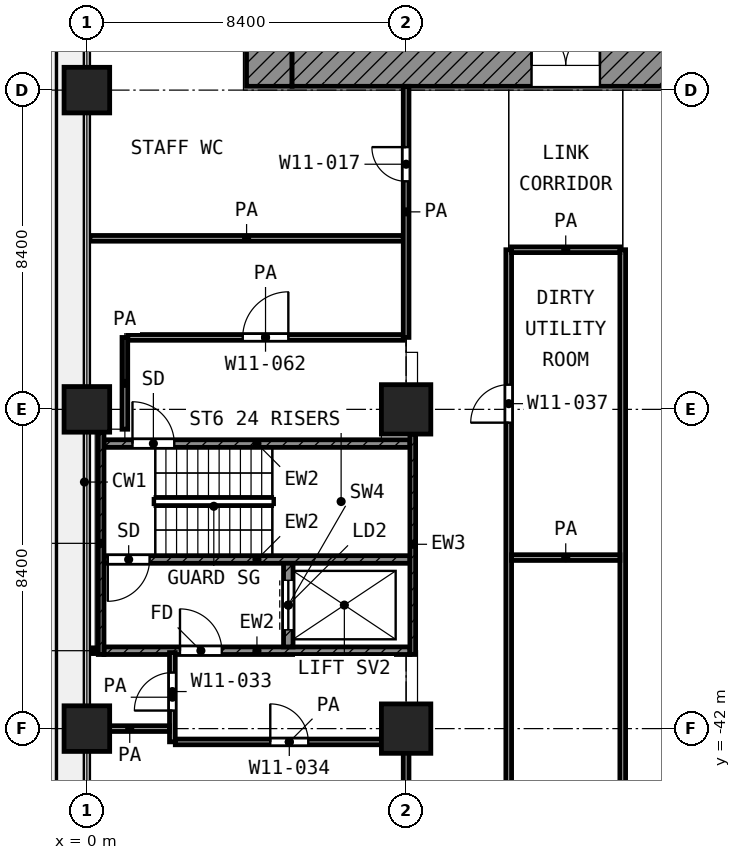
"""IFC4 building model, lengths in metres.
Left out: names, types, materials, properties, quantities, classifications, styles, units other than length and angle.
Written with IfcOpenShell. Run it as: python <this file> out.ifc"""

import sys

from ifc_helpers import new_model, si_unit, direction, frame, frame_2d, origin, origin_2d, place, context, subcontext, project, spatial, rectangle, extrude, element, fill, save


model = new_model("IFC4")
c1 = context("Model", 3, precision=1e-05, world=origin(), true_north=direction((0.0, 1.0)))
c2 = subcontext(c1, "Body", "Model", "MODEL_VIEW")
j1 = project(units=[si_unit("LENGTHUNIT", "METRE"), si_unit("PLANEANGLEUNIT", "RADIAN")], contexts=[c1])
p1 = place(None, origin())
s1 = spatial("IfcSite", under=j1, at=p1, CompositionType="ELEMENT")
p2 = place(p1, origin())
s2 = spatial("IfcBuilding", under=s1, at=p2, CompositionType="ELEMENT")
p3 = place(p2, frame((0.0, 0.0, 51.8)))
s3 = spatial("IfcBuildingStorey", under=s2, at=p3, CompositionType="ELEMENT", Elevation=51.8)
for number, where, z_axis, x_axis in (
    (1, (0.0, -25.2, 0.0), (0.0, 0.0, 1.0), (1.0, 0.0, 0.0)),
    (2, (0.0, -33.6, 0.0), (0.0, 0.0, 1.0), (1.0, 0.0, 0.0)),
):
    element("IfcColumn", number, at=place(p3, frame(where, z_axis=z_axis, x_axis=x_axis)), inside=s3, PredefinedType="COLUMN", context=c2, shape_type="SweptSolid", body=[
        extrude(rectangle(XDim=1.2, YDim=1.2, at=origin_2d()), origin(), (0.0, 0.0, 1.0), 4.2),
    ])
p4 = place(p3, frame((8.4, -33.6, 0.0), z_axis=(0.0, 0.0, 1.0), x_axis=(1.0, 0.0, 0.0)))
e3 = element("IfcColumn", 3, at=p4, inside=s3, PredefinedType="COLUMN", context=c2, shape_type="SweptSolid", body=[
    extrude(rectangle(XDim=1.3, YDim=1.3, at=origin_2d()), origin(), (0.0, 0.0, 1.0), 4.2),
])
p5 = place(p3, frame((0.0, -42.0, 0.0), z_axis=(0.0, 0.0, 1.0), x_axis=(1.0, 0.0, 0.0)))
e4 = element("IfcColumn", 4, at=p5, inside=s3, PredefinedType="COLUMN", context=c2, shape_type="SweptSolid", body=[
    extrude(rectangle(XDim=1.2, YDim=1.2, at=origin_2d()), origin(), (0.0, 0.0, 1.0), 4.2),
])
p6 = place(p3, frame((8.4, -42.0, 0.0), z_axis=(0.0, 0.0, 1.0), x_axis=(1.0, 0.0, 0.0)))
e5 = element("IfcColumn", 5, at=p6, inside=s3, PredefinedType="COLUMN", context=c2, shape_type="SweptSolid", body=[
    extrude(rectangle(XDim=1.3, YDim=1.3, at=origin_2d()), origin(), (0.0, 0.0, 1.0), 4.2),
])
p7 = place(p3, frame((4.8, -25.1, 0.0), z_axis=(0.0, 0.0, 1.0), x_axis=(0.0, 1.0, 0.0)))
e6 = element("IfcWall", 6, at=p7, inside=s3, PredefinedType="SHEAR", context=c2, shape_type="SweptSolid", body=[
    extrude(rectangle(XDim=19.7, YDim=1.2, at=frame_2d((9.85, 0.0))), origin(), (0.0, 0.0, 1.0), 3.9),
])
p8 = place(p7, frame((11.55, 0.0, 0.0)))
e7 = element("IfcOpeningElement", 7, at=p8, cuts=e6, PredefinedType="OPENING", context=c2, shape_type="SweptSolid", body=[
    extrude(rectangle(XDim=1.1, YDim=2.1, at=frame_2d((0.55, 1.05))), frame((0.0, 0.61, 0.0), z_axis=(0.0, -1.0, 0.0), x_axis=(1.0, 0.0, 0.0)), (0.0, 0.0, 1.0), 1.22),
])
p9 = place(p7, frame((2.25, 0.0, 0.0)))
e8 = element("IfcOpeningElement", 8, at=p9, cuts=e6, PredefinedType="OPENING", context=c2, shape_type="SweptSolid", body=[
    extrude(rectangle(XDim=1.1, YDim=2.1, at=frame_2d((0.55, 1.05))), frame((0.0, 0.61, 0.0), z_axis=(0.0, -1.0, 0.0), x_axis=(1.0, 0.0, 0.0)), (0.0, 0.0, 1.0), 1.22),
])
p10 = place(p3, frame((5.4, -24.55, 0.0), z_axis=(0.0, 0.0, 1.0), x_axis=(1.0, 0.0, 0.0)))
e9 = element("IfcWall", 9, at=p10, inside=s3, PredefinedType="SHEAR", context=c2, shape_type="SweptSolid", body=[
    extrude(rectangle(XDim=18.6, YDim=1.1, at=frame_2d((9.3, 0.0))), origin(), (0.0, 0.0, 1.0), 3.9),
])
p11 = place(p10, frame((6.3, 0.0, 0.0)))
e10 = element("IfcOpeningElement", 10, at=p11, cuts=e9, PredefinedType="OPENING", context=c2, shape_type="SweptSolid", body=[
    extrude(rectangle(XDim=1.8, YDim=2.1, at=frame_2d((0.9, 1.05))), frame((0.0, 0.56, 0.0), z_axis=(0.0, -1.0, 0.0), x_axis=(1.0, 0.0, 0.0)), (0.0, 0.0, 1.0), 1.12),
])
p12 = place(p3, frame((0.375, -40.05, 0.0), z_axis=(0.0, 0.0, 1.0), x_axis=(0.0, 1.0, 0.0)))
e11 = element("IfcWall", 11, at=p12, inside=s3, PredefinedType="SHEAR", context=c2, shape_type="SweptSolid", body=[
    extrude(rectangle(XDim=5.85, YDim=0.15, at=frame_2d((2.925, 0.0))), origin(), (0.0, 0.0, 1.0), 3.9),
])
p13 = place(p3, frame((8.575, -40.05, 0.0), z_axis=(0.0, 0.0, 1.0), x_axis=(0.0, 1.0, 0.0)))
e12 = element("IfcWall", 12, at=p13, inside=s3, PredefinedType="SHEAR", context=c2, shape_type="SweptSolid", body=[
    extrude(rectangle(XDim=5.8, YDim=0.15, at=frame_2d((2.9, 0.0))), origin(), (0.0, 0.0, 1.0), 3.9),
])
p14 = place(p3, frame((0.45, -34.5, 0.0), z_axis=(0.0, 0.0, 1.0), x_axis=(1.0, 0.0, 0.0)))
e13 = element("IfcWall", 13, at=p14, inside=s3, PredefinedType="SHEAR", context=c2, shape_type="SweptSolid", body=[
    extrude(rectangle(XDim=8.05, YDim=0.2, at=frame_2d((4.025, 0.0))), origin(), (0.0, 0.0, 1.0), 3.9),
])
p15 = place(p14, frame((0.75, 0.0, 0.0)))
e14 = element("IfcOpeningElement", 14, at=p15, cuts=e13, PredefinedType="OPENING", context=c2, shape_type="SweptSolid", body=[
    extrude(rectangle(XDim=1.1, YDim=2.1, at=frame_2d((0.55, 1.05))), frame((0.0, 0.11, 0.0), z_axis=(0.0, -1.0, 0.0), x_axis=(1.0, 0.0, 0.0)), (0.0, 0.0, 1.0), 0.22),
])
p16 = place(p3, frame((0.45, -37.55, 0.0), z_axis=(0.0, 0.0, 1.0), x_axis=(1.0, 0.0, 0.0)))
e15 = element("IfcWall", 15, at=p16, inside=s3, PredefinedType="SHEAR", context=c2, shape_type="SweptSolid", body=[
    extrude(rectangle(XDim=8.05, YDim=0.2, at=frame_2d((4.025, 0.0))), origin(), (0.0, 0.0, 1.0), 3.9),
])
p17 = place(p16, frame((0.1, 0.0, 0.0)))
e16 = element("IfcOpeningElement", 16, at=p17, cuts=e15, PredefinedType="OPENING", context=c2, shape_type="SweptSolid", body=[
    extrude(rectangle(XDim=1.1, YDim=2.1, at=frame_2d((0.55, 1.05))), frame((0.0, 0.11, 0.0), z_axis=(0.0, -1.0, 0.0), x_axis=(1.0, 0.0, 0.0)), (0.0, 0.0, 1.0), 0.22),
])
p18 = place(p3, frame((0.45, -39.95, 0.0), z_axis=(0.0, 0.0, 1.0), x_axis=(1.0, 0.0, 0.0)))
e17 = element("IfcWall", 17, at=p18, inside=s3, PredefinedType="SHEAR", context=c2, shape_type="SweptSolid", body=[
    extrude(rectangle(XDim=8.05, YDim=0.2, at=frame_2d((4.025, 0.0))), origin(), (0.0, 0.0, 1.0), 3.9),
])
p19 = place(p18, frame((2.0, 0.0, 0.0)))
e18 = element("IfcOpeningElement", 18, at=p19, cuts=e17, PredefinedType="OPENING", context=c2, shape_type="SweptSolid", body=[
    extrude(rectangle(XDim=1.1, YDim=2.1, at=frame_2d((0.55, 1.05))), frame((0.0, 0.11, 0.0), z_axis=(0.0, -1.0, 0.0), x_axis=(1.0, 0.0, 0.0)), (0.0, 0.0, 1.0), 0.22),
])
p20 = place(p3, frame((5.3, -39.85, 0.0), z_axis=(0.0, 0.0, 1.0), x_axis=(0.0, 1.0, 0.0)))
e19 = element("IfcWall", 19, at=p20, inside=s3, PredefinedType="SHEAR", context=c2, shape_type="SweptSolid", body=[
    extrude(rectangle(XDim=2.2, YDim=0.25, at=frame_2d((1.1, 0.0))), origin(), (0.0, 0.0, 1.0), 3.9),
])
p21 = place(p20, frame((0.45, 0.0, 0.0)))
e20 = element("IfcOpeningElement", 20, at=p21, cuts=e19, PredefinedType="OPENING", context=c2, shape_type="SweptSolid", body=[
    extrude(rectangle(XDim=1.3, YDim=2.1, at=frame_2d((0.65, 1.05))), frame((0.0, 0.135, 0.0), z_axis=(0.0, -1.0, 0.0), x_axis=(1.0, 0.0, 0.0)), (0.0, 0.0, 1.0), 0.27),
])
p22 = place(p3, frame((2.327, -42.35, 0.0), z_axis=(0.0, 0.0, 1.0), x_axis=(1.0, 0.0, 0.0)))
e21 = element("IfcWall", 21, at=p22, inside=s3, PredefinedType="PARTITIONING", context=c2, shape_type="SweptSolid", body=[
    extrude(rectangle(XDim=5.998, YDim=0.15, at=frame_2d((2.999, 0.0))), origin(), (0.0, 0.0, 1.0), 3.9),
])
p23 = place(p22, frame((2.499, 0.0, 0.0)))
e22 = element("IfcOpeningElement", 22, at=p23, cuts=e21, PredefinedType="OPENING", context=c2, shape_type="SweptSolid", body=[
    extrude(rectangle(XDim=1.0, YDim=2.1, at=frame_2d((0.5, 1.05))), frame((0.0, 0.085, 0.0), z_axis=(0.0, -1.0, 0.0), x_axis=(1.0, 0.0, 0.0)), (0.0, 0.0, 1.0), 0.17),
])
p24 = place(p3, frame((0.08, -42.0, 0.0), z_axis=(0.0, 0.0, 1.0), x_axis=(1.0, 0.0, 0.0)))
e23 = element("IfcWall", 23, at=p24, inside=s3, PredefinedType="PARTITIONING", context=c2, shape_type="SweptSolid", body=[
    extrude(rectangle(XDim=2.095, YDim=0.15, at=frame_2d((1.047, 0.0))), origin(), (0.0, 0.0, 1.0), 3.9),
])
p25 = place(p3, frame((0.08, -39.95, 0.0), z_axis=(0.0, 0.0, 1.0), x_axis=(1.0, 0.0, 0.0)))
e24 = element("IfcWall", 24, at=p25, inside=s3, PredefinedType="PARTITIONING", context=c2, shape_type="SweptSolid", body=[
    extrude(rectangle(XDim=0.19, YDim=0.15, at=frame_2d((0.095, 0.0))), origin(), (0.0, 0.0, 1.0), 3.9),
])
p26 = place(p3, frame((11.175, -37.5, 0.0), z_axis=(0.0, 0.0, 1.0), x_axis=(1.0, 0.0, 0.0)))
e25 = element("IfcWall", 25, at=p26, inside=s3, PredefinedType="PARTITIONING", context=c2, shape_type="SweptSolid", body=[
    extrude(rectangle(XDim=2.85, YDim=0.15, at=frame_2d((1.425, 0.0))), origin(), (0.0, 0.0, 1.0), 3.9),
])
p27 = place(p3, frame((1.077, -31.707, 0.0), z_axis=(0.0, 0.0, 1.0), x_axis=(1.0, 0.0, 0.0)))
e26 = element("IfcWall", 26, at=p27, inside=s3, PredefinedType="PARTITIONING", context=c2, shape_type="SweptSolid", body=[
    extrude(rectangle(XDim=7.248, YDim=0.15, at=frame_2d((3.624, 0.0))), origin(), (0.0, 0.0, 1.0), 3.9),
])
p28 = place(p27, frame((3.024, 0.0, 0.0)))
e27 = element("IfcOpeningElement", 27, at=p28, cuts=e26, PredefinedType="OPENING", context=c2, shape_type="SweptSolid", body=[
    extrude(rectangle(XDim=1.2, YDim=2.1, at=frame_2d((0.6, 1.05))), frame((0.0, 0.085, 0.0), z_axis=(0.0, -1.0, 0.0), x_axis=(1.0, 0.0, 0.0)), (0.0, 0.0, 1.0), 0.17),
])
p29 = place(p3, frame((11.175, -29.4, 0.0), z_axis=(0.0, 0.0, 1.0), x_axis=(1.0, 0.0, 0.0)))
e28 = element("IfcWall", 28, at=p29, inside=s3, PredefinedType="PARTITIONING", context=c2, shape_type="SweptSolid", body=[
    extrude(rectangle(XDim=2.85, YDim=0.15, at=frame_2d((1.425, 0.0))), origin(), (0.0, 0.0, 1.0), 3.9),
])
p30 = place(p3, frame((0.08, -29.1, 0.0), z_axis=(0.0, 0.0, 1.0), x_axis=(1.0, 0.0, 0.0)))
e29 = element("IfcWall", 29, at=p30, inside=s3, PredefinedType="PARTITIONING", context=c2, shape_type="SweptSolid", body=[
    extrude(rectangle(XDim=8.245, YDim=0.15, at=frame_2d((4.123, 0.0))), origin(), (0.0, 0.0, 1.0), 3.9),
])
p31 = place(p3, frame((1.0, -34.123, 0.0), z_axis=(0.0, 0.0, 1.0), x_axis=(0.0, 1.0, 0.0)))
e30 = element("IfcWall", 30, at=p31, inside=s3, PredefinedType="PARTITIONING", context=c2, shape_type="SweptSolid", body=[
    extrude(rectangle(XDim=2.415, YDim=0.15, at=frame_2d((1.208, 0.0))), origin(), (0.0, 0.0, 1.0), 3.9),
])
p32 = place(p3, frame((2.25, -42.348, 0.0), z_axis=(0.0, 0.0, 1.0), x_axis=(0.0, 1.0, 0.0)))
e31 = element("IfcWall", 31, at=p32, inside=s3, PredefinedType="PARTITIONING", context=c2, shape_type="SweptSolid", body=[
    extrude(rectangle(XDim=2.348, YDim=0.15, at=frame_2d((1.174, 0.0))), origin(), (0.0, 0.0, 1.0), 3.9),
])
p33 = place(p32, frame((0.823, 0.0, 0.0)))
e32 = element("IfcOpeningElement", 32, at=p33, cuts=e31, PredefinedType="OPENING", context=c2, shape_type="SweptSolid", body=[
    extrude(rectangle(XDim=1.0, YDim=2.1, at=frame_2d((0.5, 1.05))), frame((0.0, 0.085, 0.0), z_axis=(0.0, -1.0, 0.0), x_axis=(1.0, 0.0, 0.0)), (0.0, 0.0, 1.0), 0.17),
])
p34 = place(p3, frame((8.4, -71.32, 0.0), z_axis=(0.0, 0.0, 1.0), x_axis=(0.0, 1.0, 0.0)))
e33 = element("IfcWall", 33, at=p34, inside=s3, PredefinedType="PARTITIONING", context=c2, shape_type="SweptSolid", body=[
    extrude(rectangle(XDim=28.97, YDim=0.15, at=frame_2d((14.485, 0.0))), origin(), (0.0, 0.0, 1.0), 3.9),
])
p35 = place(p34, frame((22.82, 0.0, 0.0)))
e34 = element("IfcOpeningElement", 34, at=p35, cuts=e33, PredefinedType="OPENING", context=c2, shape_type="SweptSolid", body=[
    extrude(rectangle(XDim=1.0, YDim=2.1, at=frame_2d((0.5, 1.05))), frame((0.0, 0.085, 0.0), z_axis=(0.0, -1.0, 0.0), x_axis=(1.0, 0.0, 0.0)), (0.0, 0.0, 1.0), 0.17),
])
p36 = place(p34, frame((19.02, 0.0, 0.0)))
e35 = element("IfcOpeningElement", 35, at=p36, cuts=e33, PredefinedType="OPENING", context=c2, shape_type="SweptSolid", body=[
    extrude(rectangle(XDim=1.2, YDim=2.1, at=frame_2d((0.6, 1.05))), frame((0.0, 0.085, 0.0), z_axis=(0.0, -1.0, 0.0), x_axis=(1.0, 0.0, 0.0)), (0.0, 0.0, 1.0), 0.17),
])
p37 = place(p34, frame((13.22, 0.0, 0.0)))
e36 = element("IfcOpeningElement", 36, at=p37, cuts=e33, PredefinedType="OPENING", context=c2, shape_type="SweptSolid", body=[
    extrude(rectangle(XDim=1.2, YDim=2.1, at=frame_2d((0.6, 1.05))), frame((0.0, 0.085, 0.0), z_axis=(0.0, -1.0, 0.0), x_axis=(1.0, 0.0, 0.0)), (0.0, 0.0, 1.0), 0.17),
])
p38 = place(p34, frame((10.12, 0.0, 0.0)))
e37 = element("IfcOpeningElement", 37, at=p38, cuts=e33, PredefinedType="OPENING", context=c2, shape_type="SweptSolid", body=[
    extrude(rectangle(XDim=1.2, YDim=2.1, at=frame_2d((0.6, 1.05))), frame((0.0, 0.085, 0.0), z_axis=(0.0, -1.0, 0.0), x_axis=(1.0, 0.0, 0.0)), (0.0, 0.0, 1.0), 0.17),
])
p39 = place(p34, frame((2.42, 0.0, 0.0)))
e38 = element("IfcOpeningElement", 38, at=p39, cuts=e33, PredefinedType="OPENING", context=c2, shape_type="SweptSolid", body=[
    extrude(rectangle(XDim=1.0, YDim=2.1, at=frame_2d((0.5, 1.05))), frame((0.0, 0.085, 0.0), z_axis=(0.0, -1.0, 0.0), x_axis=(1.0, 0.0, 0.0)), (0.0, 0.0, 1.0), 0.17),
])
p40 = place(p3, frame((8.4, -31.707, 0.0), z_axis=(0.0, 0.0, 1.0), x_axis=(0.0, 1.0, 0.0)))
e39 = element("IfcWall", 39, at=p40, inside=s3, PredefinedType="PARTITIONING", context=c2, shape_type="SweptSolid", body=[
    extrude(rectangle(XDim=6.607, YDim=0.15, at=frame_2d((3.303, 0.0))), origin(), (0.0, 0.0, 1.0), 3.9),
])
p41 = place(p40, frame((4.107, 0.0, 0.0)))
e40 = element("IfcOpeningElement", 40, at=p41, cuts=e39, PredefinedType="OPENING", context=c2, shape_type="SweptSolid", body=[
    extrude(rectangle(XDim=0.9, YDim=2.1, at=frame_2d((0.45, 1.05))), frame((0.0, 0.085, 0.0), z_axis=(0.0, -1.0, 0.0), x_axis=(1.0, 0.0, 0.0)), (0.0, 0.0, 1.0), 0.17),
])
p42 = place(p3, frame((11.1, -68.7, 0.0), z_axis=(0.0, 0.0, 1.0), x_axis=(0.0, 1.0, 0.0)))
e41 = element("IfcWall", 41, at=p42, inside=s3, PredefinedType="PARTITIONING", context=c2, shape_type="SweptSolid", body=[
    extrude(rectangle(XDim=39.3, YDim=0.15, at=frame_2d((19.65, 0.0))), origin(), (0.0, 0.0, 1.0), 3.9),
])
p43 = place(p42, frame((34.75, 0.0, 0.0)))
e42 = element("IfcOpeningElement", 42, at=p43, cuts=e41, PredefinedType="OPENING", context=c2, shape_type="SweptSolid", body=[
    extrude(rectangle(XDim=1.0, YDim=2.1, at=frame_2d((0.5, 1.05))), frame((0.0, 0.085, 0.0), z_axis=(0.0, -1.0, 0.0), x_axis=(1.0, 0.0, 0.0)), (0.0, 0.0, 1.0), 0.17),
])
p44 = place(p42, frame((24.25, 0.0, 0.0)))
e43 = element("IfcOpeningElement", 43, at=p44, cuts=e41, PredefinedType="OPENING", context=c2, shape_type="SweptSolid", body=[
    extrude(rectangle(XDim=1.0, YDim=2.1, at=frame_2d((0.5, 1.05))), frame((0.0, 0.085, 0.0), z_axis=(0.0, -1.0, 0.0), x_axis=(1.0, 0.0, 0.0)), (0.0, 0.0, 1.0), 0.17),
])
p45 = place(p42, frame((16.0, 0.0, 0.0)))
e44 = element("IfcOpeningElement", 44, at=p45, cuts=e41, PredefinedType="OPENING", context=c2, shape_type="SweptSolid", body=[
    extrude(rectangle(XDim=1.0, YDim=2.1, at=frame_2d((0.5, 1.05))), frame((0.0, 0.085, 0.0), z_axis=(0.0, -1.0, 0.0), x_axis=(1.0, 0.0, 0.0)), (0.0, 0.0, 1.0), 0.17),
])
p46 = place(p42, frame((11.85, 0.0, 0.0)))
e45 = element("IfcOpeningElement", 45, at=p46, cuts=e41, PredefinedType="OPENING", context=c2, shape_type="SweptSolid", body=[
    extrude(rectangle(XDim=0.9, YDim=2.1, at=frame_2d((0.45, 1.05))), frame((0.0, 0.085, 0.0), z_axis=(0.0, -1.0, 0.0), x_axis=(1.0, 0.0, 0.0)), (0.0, 0.0, 1.0), 0.17),
])
p47 = place(p3, frame((14.1, -68.7, 0.0), z_axis=(0.0, 0.0, 1.0), x_axis=(0.0, 1.0, 0.0)))
e46 = element("IfcWall", 46, at=p47, inside=s3, PredefinedType="PARTITIONING", context=c2, shape_type="SweptSolid", body=[
    extrude(rectangle(XDim=39.3, YDim=0.15, at=frame_2d((19.65, 0.0))), origin(), (0.0, 0.0, 1.0), 3.9),
])
p48 = place(p47, frame((4.35, 0.0, 0.0)))
e47 = element("IfcOpeningElement", 47, at=p48, cuts=e46, PredefinedType="OPENING", context=c2, shape_type="SweptSolid", body=[
    extrude(rectangle(XDim=1.2, YDim=2.1, at=frame_2d((0.6, 1.05))), frame((0.0, 0.085, 0.0), z_axis=(0.0, -1.0, 0.0), x_axis=(1.0, 0.0, 0.0)), (0.0, 0.0, 1.0), 0.17),
])
p49 = place(p11, origin())
e48 = element("IfcDoor", 48, at=p49, inside=s3, OperationType="DOUBLE_DOOR_SINGLE_SWING", PredefinedType="DOOR", context=c2, shape_type="SweptSolid", body=[
    extrude(rectangle(XDim=1.8, YDim=2.1, at=frame_2d((0.9, 1.05))), frame((0.0, 0.025, 0.0), z_axis=(0.0, -1.0, 0.0), x_axis=(1.0, 0.0, 0.0)), (0.0, 0.0, 1.0), 0.05),
])
fill(e10, e48)
p50 = place(p15, origin())
e49 = element("IfcDoor", 49, at=p50, inside=s3, OperationType="SINGLE_SWING_LEFT", PredefinedType="DOOR", context=c2, shape_type="SweptSolid", body=[
    extrude(rectangle(XDim=1.1, YDim=2.1, at=frame_2d((0.55, 1.05))), frame((0.0, 0.025, 0.0), z_axis=(0.0, -1.0, 0.0), x_axis=(1.0, 0.0, 0.0)), (0.0, 0.0, 1.0), 0.05),
])
fill(e14, e49)
p51 = place(p17, frame((1.1, 0.0, 0.0), z_axis=(0.0, 0.0, 1.0), x_axis=(-1.0, 0.0, 0.0)))
e50 = element("IfcDoor", 50, at=p51, inside=s3, OperationType="SINGLE_SWING_LEFT", PredefinedType="DOOR", context=c2, shape_type="SweptSolid", body=[
    extrude(rectangle(XDim=1.1, YDim=2.1, at=frame_2d((0.55, 1.05))), frame((0.0, 0.025, 0.0), z_axis=(0.0, -1.0, 0.0), x_axis=(1.0, 0.0, 0.0)), (0.0, 0.0, 1.0), 0.05),
])
fill(e16, e50)
p52 = place(p21, origin())
e51 = element("IfcDoor", 51, at=p52, inside=s3, OperationType="DOUBLE_DOOR_SLIDING", PredefinedType="DOOR", context=c2, shape_type="SweptSolid", body=[
    extrude(rectangle(XDim=1.3, YDim=2.1, at=frame_2d((0.65, 1.05))), frame((0.0, 0.025, 0.0), z_axis=(0.0, -1.0, 0.0), x_axis=(1.0, 0.0, 0.0)), (0.0, 0.0, 1.0), 0.05),
])
fill(e20, e51)
p53 = place(p19, origin())
e52 = element("IfcDoor", 52, at=p53, inside=s3, OperationType="SINGLE_SWING_LEFT", PredefinedType="DOOR", context=c2, shape_type="SweptSolid", body=[
    extrude(rectangle(XDim=1.1, YDim=2.1, at=frame_2d((0.55, 1.05))), frame((0.0, 0.025, 0.0), z_axis=(0.0, -1.0, 0.0), x_axis=(1.0, 0.0, 0.0)), (0.0, 0.0, 1.0), 0.05),
])
fill(e18, e52)
p54 = place(p41, origin())
e53 = element("IfcDoor", 53, at=p54, inside=s3, OperationType="SINGLE_SWING_RIGHT", PredefinedType="DOOR", context=c2, shape_type="SweptSolid", body=[
    extrude(rectangle(XDim=0.9, YDim=2.1, at=frame_2d((0.45, 1.05))), frame((0.0, 0.025, 0.0), z_axis=(0.0, -1.0, 0.0), x_axis=(1.0, 0.0, 0.0)), (0.0, 0.0, 1.0), 0.05),
])
fill(e40, e53)
p55 = place(p28, origin())
e54 = element("IfcDoor", 54, at=p55, inside=s3, OperationType="SINGLE_SWING_RIGHT", PredefinedType="DOOR", context=c2, shape_type="SweptSolid", body=[
    extrude(rectangle(XDim=1.2, YDim=2.1, at=frame_2d((0.6, 1.05))), frame((0.0, 0.025, 0.0), z_axis=(0.0, -1.0, 0.0), x_axis=(1.0, 0.0, 0.0)), (0.0, 0.0, 1.0), 0.05),
])
fill(e27, e54)
p56 = place(p33, origin())
e55 = element("IfcDoor", 55, at=p56, inside=s3, OperationType="SINGLE_SWING_LEFT", PredefinedType="DOOR", context=c2, shape_type="SweptSolid", body=[
    extrude(rectangle(XDim=1.0, YDim=2.1, at=frame_2d((0.5, 1.05))), frame((0.0, 0.025, 0.0), z_axis=(0.0, -1.0, 0.0), x_axis=(1.0, 0.0, 0.0)), (0.0, 0.0, 1.0), 0.05),
])
fill(e32, e55)
p57 = place(p23, origin())
e56 = element("IfcDoor", 56, at=p57, inside=s3, OperationType="SINGLE_SWING_LEFT", PredefinedType="DOOR", context=c2, shape_type="SweptSolid", body=[
    extrude(rectangle(XDim=1.0, YDim=2.1, at=frame_2d((0.5, 1.05))), frame((0.0, 0.025, 0.0), z_axis=(0.0, -1.0, 0.0), x_axis=(1.0, 0.0, 0.0)), (0.0, 0.0, 1.0), 0.05),
])
fill(e22, e56)
p58 = place(p43, origin())
e57 = element("IfcDoor", 57, at=p58, inside=s3, OperationType="SINGLE_SWING_LEFT", PredefinedType="DOOR", context=c2, shape_type="SweptSolid", body=[
    extrude(rectangle(XDim=1.0, YDim=2.1, at=frame_2d((0.5, 1.05))), frame((0.0, 0.025, 0.0), z_axis=(0.0, -1.0, 0.0), x_axis=(1.0, 0.0, 0.0)), (0.0, 0.0, 1.0), 0.05),
])
fill(e42, e57)
save(model, sys.argv[1])
